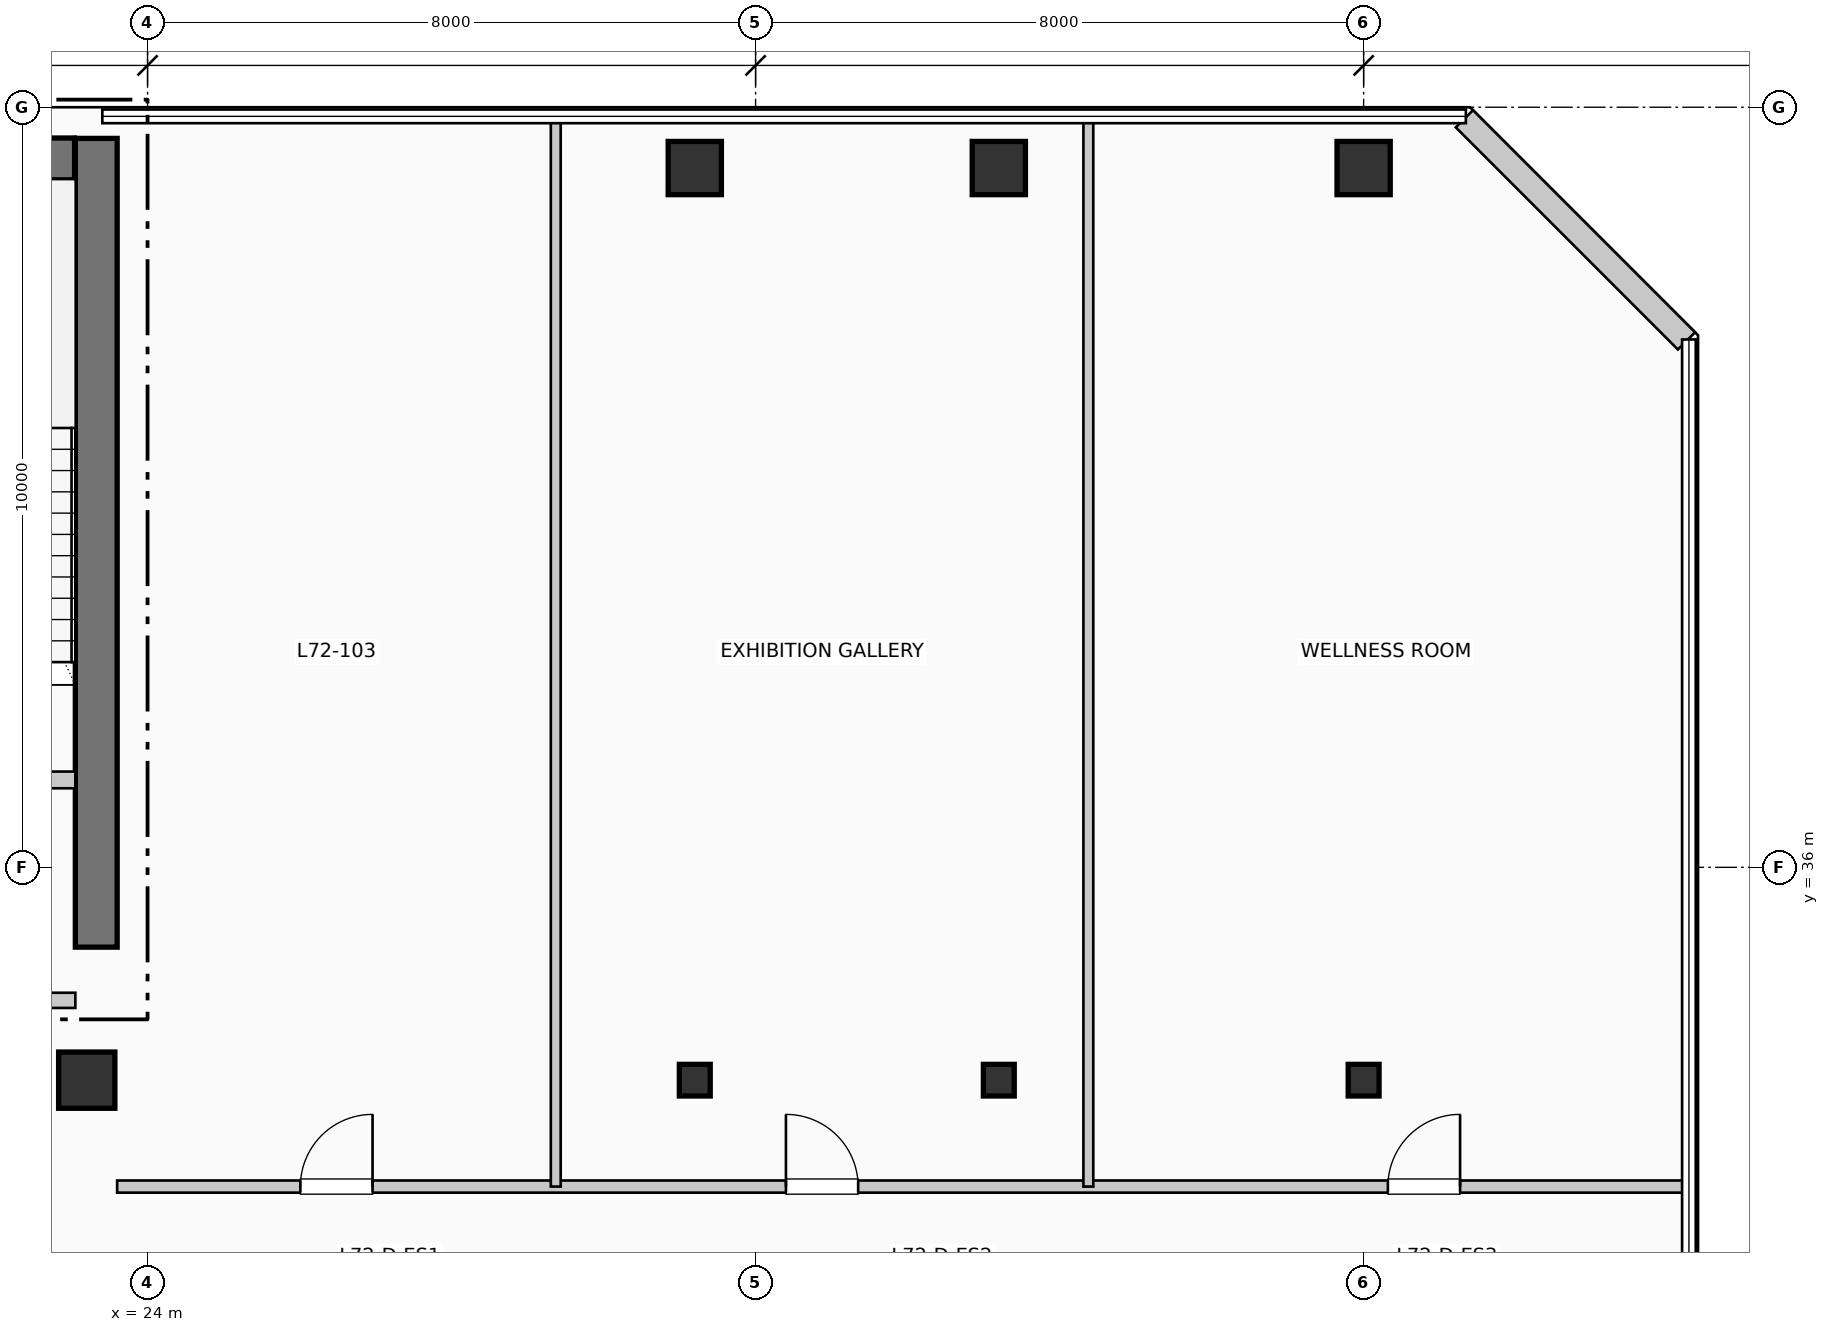
"""IFC4 building model, lengths in metres.
Left out: names, types, materials, properties, quantities, classifications, styles, units other than length and angle.
Written with IfcOpenShell. Run it as: python <this file> out.ifc"""

import sys

from ifc_helpers import new_model, si_unit, direction, frame, frame_2d, origin, origin_2d, place, context, subcontext, project, spatial, rectangle, i_section, extrude, element, fill, save


model = new_model("IFC4")
c1 = context("Model", 3, precision=1e-05, world=origin(), true_north=direction((0.0, 1.0)))
c2 = subcontext(c1, "Body", "Model", "MODEL_VIEW")
j1 = project(units=[si_unit("LENGTHUNIT", "METRE"), si_unit("PLANEANGLEUNIT", "RADIAN")], contexts=[c1])
p1 = place(None, origin())
s1 = spatial("IfcSite", under=j1, at=p1, CompositionType="ELEMENT")
p2 = place(p1, origin())
s2 = spatial("IfcBuilding", under=s1, at=p2, CompositionType="ELEMENT")
p3 = place(p2, frame((0.0, 0.0, 296.01)))
s3 = spatial("IfcBuildingStorey", under=s2, at=p3, CompositionType="ELEMENT", Elevation=296.01)
p4 = place(p3, frame((23.325, 34.95, 0.0), z_axis=(0.0, 0.0, 1.0), x_axis=(0.0, 1.0, 0.0)))
e1 = element("IfcWall", 1, at=p4, inside=s3, PredefinedType="SHEAR", context=c2, shape_type="SweptSolid", body=[
    extrude(rectangle(XDim=10.64, YDim=0.55, at=frame_2d((5.32, 0.0))), origin(), (0.0, 0.0, 1.0), 3.96),
])
p5 = place(p3, frame((19.35, 45.32, 0.0), z_axis=(0.0, 0.0, 1.0), x_axis=(1.0, 0.0, 0.0)))
e2 = element("IfcWall", 2, at=p5, inside=s3, PredefinedType="SHEAR", context=c2, shape_type="SweptSolid", body=[
    extrude(rectangle(XDim=3.69, YDim=0.55, at=frame_2d((1.845, 0.0))), origin(), (0.0, 0.0, 1.0), 3.96),
])
p6 = place(p5, frame((1.15, 0.0, 1.05)))
e3 = element("IfcOpeningElement", 3, at=p6, cuts=e2, PredefinedType="OPENING", context=c2, shape_type="SweptSolid", body=[
    extrude(rectangle(XDim=1.4, YDim=1.8, at=frame_2d((0.7, 0.9))), frame((0.0, 0.285, 0.0), z_axis=(0.0, -1.0, 0.0), x_axis=(1.0, 0.0, 0.0)), (0.0, 0.0, 1.0), 0.57),
])
p7 = place(p3, frame((23.2, 33.2, 0.0), z_axis=(0.0, 0.0, 1.0), x_axis=(1.0, 0.0, 0.0)))
e4 = element("IfcColumn", 4, at=p7, inside=s3, PredefinedType="COLUMN", context=c2, shape_type="SweptSolid", body=[
    extrude(rectangle(XDim=0.74, YDim=0.74, at=origin_2d()), origin(), (0.0, 0.0, 1.0), 3.96),
])
p8 = place(p3, frame((31.2, 33.2, 0.0), z_axis=(0.0, 0.0, 1.0), x_axis=(1.0, 0.0, 0.0)))
e5 = element("IfcColumn", 5, at=p8, inside=s3, PredefinedType="COLUMN", context=c2, shape_type="SweptSolid", body=[
    extrude(i_section(OverallWidth=0.406, OverallDepth=0.416, WebThickness=0.022, FlangeThickness=0.036, at=origin_2d()), origin(), (0.0, 0.0, 1.0), 3.96),
])
p9 = place(p3, frame((31.2, 45.2, 0.0), z_axis=(0.0, 0.0, 1.0), x_axis=(1.0, 0.0, 0.0)))
e6 = element("IfcColumn", 6, at=p9, inside=s3, PredefinedType="COLUMN", context=c2, shape_type="SweptSolid", body=[
    extrude(rectangle(XDim=0.7, YDim=0.7, at=origin_2d()), origin(), (0.0, 0.0, 1.0), 3.96),
])
p10 = place(p3, frame((35.2, 33.2, 0.0), z_axis=(0.0, 0.0, 1.0), x_axis=(1.0, 0.0, 0.0)))
e7 = element("IfcColumn", 7, at=p10, inside=s3, PredefinedType="COLUMN", context=c2, shape_type="SweptSolid", body=[
    extrude(i_section(OverallWidth=0.406, OverallDepth=0.416, WebThickness=0.022, FlangeThickness=0.036, at=origin_2d()), origin(), (0.0, 0.0, 1.0), 3.96),
])
p11 = place(p3, frame((35.2, 45.2, 0.0), z_axis=(0.0, 0.0, 1.0), x_axis=(1.0, 0.0, 0.0)))
e8 = element("IfcColumn", 8, at=p11, inside=s3, PredefinedType="COLUMN", context=c2, shape_type="SweptSolid", body=[
    extrude(rectangle(XDim=0.7, YDim=0.7, at=origin_2d()), origin(), (0.0, 0.0, 1.0), 3.96),
])
p12 = place(p3, frame((40.0, 33.2, 0.0), z_axis=(0.0, 0.0, 1.0), x_axis=(1.0, 0.0, 0.0)))
e9 = element("IfcColumn", 9, at=p12, inside=s3, PredefinedType="COLUMN", context=c2, shape_type="SweptSolid", body=[
    extrude(i_section(OverallWidth=0.406, OverallDepth=0.416, WebThickness=0.022, FlangeThickness=0.036, at=origin_2d()), origin(), (0.0, 0.0, 1.0), 3.96),
])
p13 = place(p3, frame((40.0, 45.2, 0.0), z_axis=(0.0, 0.0, 1.0), x_axis=(1.0, 0.0, 0.0)))
e10 = element("IfcColumn", 10, at=p13, inside=s3, PredefinedType="COLUMN", context=c2, shape_type="SweptSolid", body=[
    extrude(rectangle(XDim=0.7, YDim=0.7, at=origin_2d()), origin(), (0.0, 0.0, 1.0), 3.96),
])
p14 = place(p3, frame((44.248, 42.926, 0.0), z_axis=(0.0, 0.0, 1.0), x_axis=(-0.707136318428, 0.707077242712, 0.0)))
e11 = element("IfcWall", 11, at=p14, inside=s3, PredefinedType="SOLIDWALL", context=c2, shape_type="SweptSolid", body=[
    extrude(rectangle(XDim=4.133, YDim=0.32, at=frame_2d((2.066, 0.0))), origin(), (0.0, 0.0, 1.0), 3.74),
])
p15 = place(p3, frame((19.9, 37.15, 0.0), z_axis=(0.0, 0.0, 1.0), x_axis=(1.0, 0.0, 0.0)))
e12 = element("IfcWall", 12, at=p15, inside=s3, PredefinedType="PARTITIONING", context=c2, shape_type="SweptSolid", body=[
    extrude(rectangle(XDim=3.15, YDim=0.22, at=frame_2d((1.575, 0.0))), origin(), (0.0, 0.0, 1.0), 3.74),
])
p16 = place(p15, frame((2.05, 0.0, 0.0), z_axis=(0.0, 0.0, 1.0), x_axis=(-1.0, 0.0, 0.0)))
e13 = element("IfcOpeningElement", 13, at=p16, cuts=e12, PredefinedType="OPENING", context=c2, shape_type="SweptSolid", body=[
    extrude(rectangle(XDim=1.05, YDim=2.15, at=frame_2d((0.525, 1.075))), frame((0.0, 0.12, 0.0), z_axis=(0.0, -1.0, 0.0), x_axis=(1.0, 0.0, 0.0)), (0.0, 0.0, 1.0), 0.24),
])
p17 = place(p3, frame((19.8, 34.25, 0.0), z_axis=(0.0, 0.0, 1.0), x_axis=(1.0, 0.0, 0.0)))
e14 = element("IfcWall", 14, at=p17, inside=s3, PredefinedType="PARTITIONING", context=c2, shape_type="SweptSolid", body=[
    extrude(rectangle(XDim=3.25, YDim=0.2, at=frame_2d((1.625, 0.0))), origin(), (0.0, 0.0, 1.0), 3.74),
])
p18 = place(p17, frame((2.15, 0.0, 0.0), z_axis=(0.0, 0.0, 1.0), x_axis=(-1.0, 0.0, 0.0)))
e15 = element("IfcOpeningElement", 15, at=p18, cuts=e14, PredefinedType="OPENING", context=c2, shape_type="SweptSolid", body=[
    extrude(rectangle(XDim=1.1, YDim=2.15, at=frame_2d((0.55, 1.075))), frame((0.0, 0.11, 0.0), z_axis=(0.0, -1.0, 0.0), x_axis=(1.0, 0.0, 0.0)), (0.0, 0.0, 1.0), 0.22),
])
p19 = place(p3, frame((23.6, 31.8, 0.0), z_axis=(0.0, 0.0, 1.0), x_axis=(1.0, 0.0, 0.0)))
e16 = element("IfcWall", 16, at=p19, inside=s3, PredefinedType="PARTITIONING", context=c2, shape_type="SweptSolid", body=[
    extrude(rectangle(XDim=20.61, YDim=0.16, at=frame_2d((10.305, 0.0))), origin(), (0.0, 0.0, 1.0), 3.74),
])
p20 = place(p19, frame((2.41, 0.0, 0.0)))
e17 = element("IfcOpeningElement", 17, at=p20, cuts=e16, PredefinedType="OPENING", context=c2, shape_type="SweptSolid", body=[
    extrude(rectangle(XDim=0.95, YDim=2.15, at=frame_2d((0.475, 1.075))), frame((0.0, 0.09, 0.0), z_axis=(0.0, -1.0, 0.0), x_axis=(1.0, 0.0, 0.0)), (0.0, 0.0, 1.0), 0.18),
])
p21 = place(p19, frame((8.8, 0.0, 0.0)))
e18 = element("IfcOpeningElement", 18, at=p21, cuts=e16, PredefinedType="OPENING", context=c2, shape_type="SweptSolid", body=[
    extrude(rectangle(XDim=0.95, YDim=2.15, at=frame_2d((0.475, 1.075))), frame((0.0, 0.09, 0.0), z_axis=(0.0, -1.0, 0.0), x_axis=(1.0, 0.0, 0.0)), (0.0, 0.0, 1.0), 0.18),
])
p22 = place(p19, frame((16.719, 0.0, 0.0)))
e19 = element("IfcOpeningElement", 19, at=p22, cuts=e16, PredefinedType="OPENING", context=c2, shape_type="SweptSolid", body=[
    extrude(rectangle(XDim=0.95, YDim=2.15, at=frame_2d((0.475, 1.075))), frame((0.0, 0.09, 0.0), z_axis=(0.0, -1.0, 0.0), x_axis=(1.0, 0.0, 0.0)), (0.0, 0.0, 1.0), 0.18),
])
for number, where, z_axis, x_axis in (
    (20, (29.371, 31.8, 0.0), (0.0, 0.0, 1.0), (0.0, 1.0, 0.0)),
    (21, (36.378, 31.8, 0.0), (0.0, 0.0, 1.0), (0.0, 1.0, 0.0)),
):
    element("IfcWall", number, at=place(p3, frame(where, z_axis=z_axis, x_axis=x_axis)), inside=s3, PredefinedType="PARTITIONING", context=c2, shape_type="SweptSolid", body=[
        extrude(rectangle(XDim=14.01, YDim=0.13, at=frame_2d((7.005, 0.0))), origin(), (0.0, 0.0, 1.0), 3.74),
    ])
p23 = place(p20, origin())
e22 = element("IfcDoor", 22, at=p23, inside=s3, OperationType="SINGLE_SWING_RIGHT", PredefinedType="DOOR", context=c2, shape_type="SweptSolid", body=[
    extrude(rectangle(XDim=0.95, YDim=2.15, at=frame_2d((0.475, 1.075))), frame((0.0, 0.025, 0.0), z_axis=(0.0, -1.0, 0.0), x_axis=(1.0, 0.0, 0.0)), (0.0, 0.0, 1.0), 0.05),
])
fill(e17, e22)
p24 = place(p21, origin())
e23 = element("IfcDoor", 23, at=p24, inside=s3, OperationType="SINGLE_SWING_LEFT", PredefinedType="DOOR", context=c2, shape_type="SweptSolid", body=[
    extrude(rectangle(XDim=0.95, YDim=2.15, at=frame_2d((0.475, 1.075))), frame((0.0, 0.025, 0.0), z_axis=(0.0, -1.0, 0.0), x_axis=(1.0, 0.0, 0.0)), (0.0, 0.0, 1.0), 0.05),
])
fill(e18, e23)
p25 = place(p22, origin())
e24 = element("IfcDoor", 24, at=p25, inside=s3, OperationType="SINGLE_SWING_RIGHT", PredefinedType="DOOR", context=c2, shape_type="SweptSolid", body=[
    extrude(rectangle(XDim=0.95, YDim=2.15, at=frame_2d((0.475, 1.075))), frame((0.0, 0.025, 0.0), z_axis=(0.0, -1.0, 0.0), x_axis=(1.0, 0.0, 0.0)), (0.0, 0.0, 1.0), 0.05),
])
fill(e19, e24)
save(model, sys.argv[1])
